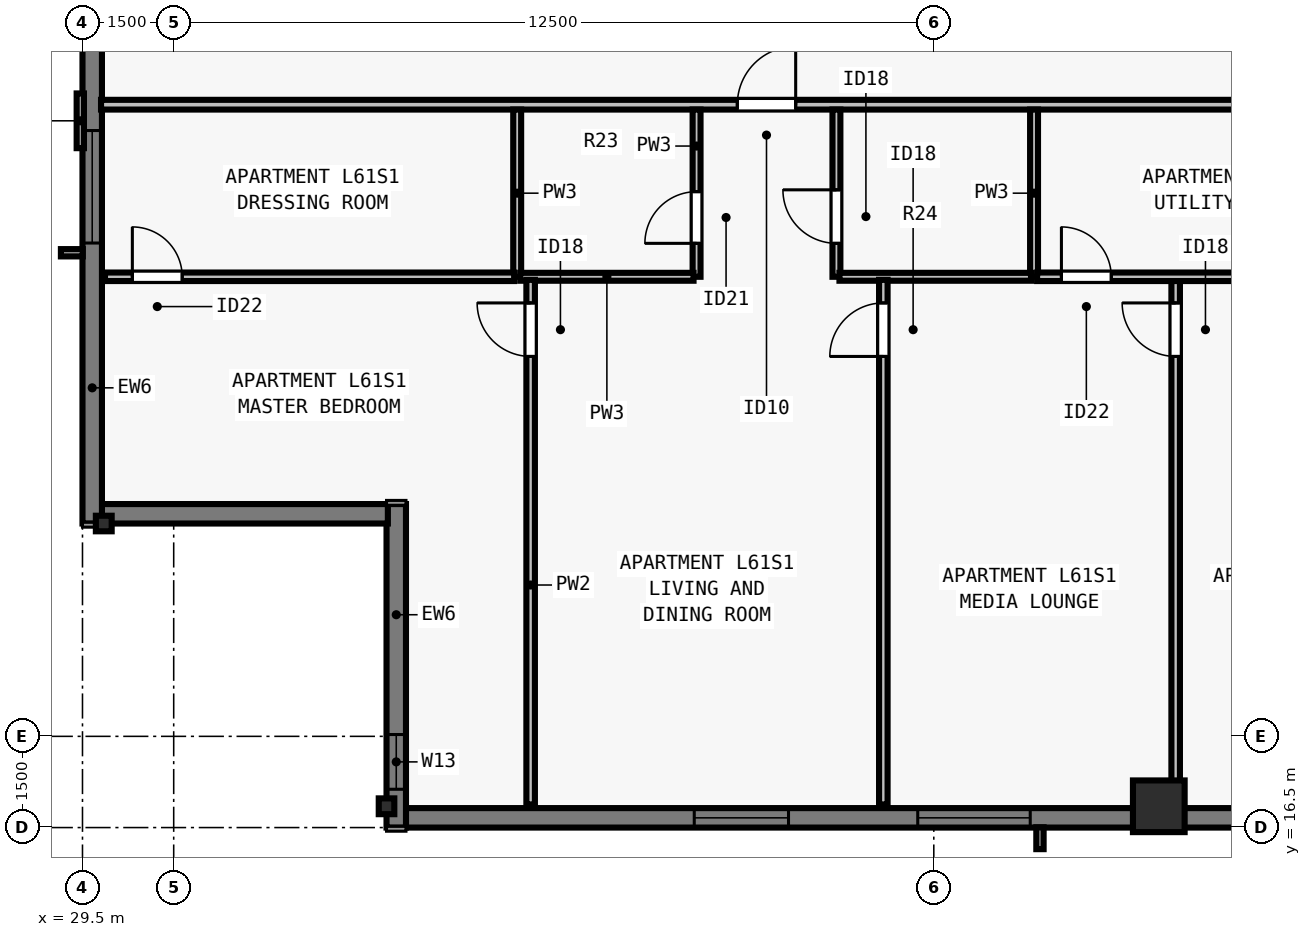
"""IFC4 building model, lengths in metres.
Left out: names, types, materials, properties, quantities, classifications, styles, units other than length and angle.
Written with IfcOpenShell. Run it as: python <this file> out.ifc"""

import sys

from ifc_helpers import new_model, si_unit, direction, frame, frame_2d, origin, origin_2d, place, context, subcontext, project, spatial, rectangle, i_section, extrude, element, fill, save


model = new_model("IFC4")
c1 = context("Model", 3, precision=1e-05, world=origin(), true_north=direction((0.0, 1.0)))
c2 = subcontext(c1, "Body", "Model", "MODEL_VIEW")
j1 = project(units=[si_unit("LENGTHUNIT", "METRE"), si_unit("PLANEANGLEUNIT", "RADIAN")], contexts=[c1])
p1 = place(None, origin())
s1 = spatial("IfcSite", under=j1, at=p1, CompositionType="ELEMENT")
p2 = place(p1, origin())
s2 = spatial("IfcBuilding", under=s1, at=p2, CompositionType="ELEMENT")
p3 = place(p2, frame((0.0, 0.0, 223.5)))
s3 = spatial("IfcBuildingStorey", under=s2, at=p3, CompositionType="ELEMENT", Elevation=223.5)
p4 = place(p3, frame((34.5, 16.85, 0.0), z_axis=(0.0, 0.0, 1.0), x_axis=(1.0, 0.0, 0.0)))
e1 = element("IfcColumn", 1, at=p4, inside=s3, PredefinedType="COLUMN", context=c2, shape_type="SweptSolid", body=[
    extrude(i_section(OverallWidth=0.256, OverallDepth=0.26, WebThickness=0.01, FlangeThickness=0.017, FilletRadius=0.013, at=origin_2d()), origin(), (0.0, 0.0, 1.0), 3.5),
])
p5 = place(p3, frame((47.2, 16.85, 0.0), z_axis=(0.0, 0.0, 1.0), x_axis=(1.0, 0.0, 0.0)))
e2 = element("IfcColumn", 2, at=p5, inside=s3, PredefinedType="COLUMN", context=c2, shape_type="SweptSolid", body=[
    extrude(rectangle(XDim=0.85, YDim=0.85, at=origin_2d()), origin(), (0.0, 0.0, 1.0), 3.5),
])
p6 = place(p3, frame((29.85, 21.5, 0.0), z_axis=(0.0, 0.0, 1.0), x_axis=(0.0, 1.0, 0.0)))
e3 = element("IfcColumn", 3, at=p6, inside=s3, PredefinedType="COLUMN", context=c2, shape_type="SweptSolid", body=[
    extrude(i_section(OverallWidth=0.256, OverallDepth=0.26, WebThickness=0.01, FlangeThickness=0.017, FilletRadius=0.013, at=origin_2d()), origin(), (0.0, 0.0, 1.0), 3.5),
])
p7 = place(p3, frame((69.5, 16.66, 0.0), z_axis=(0.0, 0.0, 1.0), x_axis=(-1.0, 0.0, 0.0)))
e4 = element("IfcWall", 4, at=p7, inside=s3, PredefinedType="SOLIDWALL", context=c2, shape_type="SweptSolid", body=[
    extrude(rectangle(XDim=34.702, YDim=0.32, at=frame_2d((17.351, 0.0))), origin(), (0.0, 0.0, 1.0), 3.29),
])
p8 = place(p7, frame((5.863, 0.0, 0.8)))
e5 = element("IfcOpeningElement", 5, at=p8, cuts=e4, PredefinedType="OPENING", context=c2, shape_type="SweptSolid", body=[
    extrude(rectangle(XDim=1.85, YDim=1.678, at=frame_2d((0.925, 0.839))), frame((0.0, 0.17, 0.0), z_axis=(0.0, -1.0, 0.0), x_axis=(1.0, 0.0, 0.0)), (0.0, 0.0, 1.0), 0.34),
])
p9 = place(p7, frame((8.138, 0.0, 0.8)))
e6 = element("IfcOpeningElement", 6, at=p9, cuts=e4, PredefinedType="OPENING", context=c2, shape_type="SweptSolid", body=[
    extrude(rectangle(XDim=1.55, YDim=1.678, at=frame_2d((0.775, 0.839))), frame((0.0, 0.17, 0.0), z_axis=(0.0, -1.0, 0.0), x_axis=(1.0, 0.0, 0.0)), (0.0, 0.0, 1.0), 0.34),
])
p10 = place(p7, frame((10.113, 0.0, 0.8)))
e7 = element("IfcOpeningElement", 7, at=p10, cuts=e4, PredefinedType="OPENING", context=c2, shape_type="SweptSolid", body=[
    extrude(rectangle(XDim=1.85, YDim=1.678, at=frame_2d((0.925, 0.839))), frame((0.0, 0.17, 0.0), z_axis=(0.0, -1.0, 0.0), x_axis=(1.0, 0.0, 0.0)), (0.0, 0.0, 1.0), 0.34),
])
p11 = place(p7, frame((14.888, 0.0, 0.8)))
e8 = element("IfcOpeningElement", 8, at=p11, cuts=e4, PredefinedType="OPENING", context=c2, shape_type="SweptSolid", body=[
    extrude(rectangle(XDim=1.55, YDim=1.678, at=frame_2d((0.775, 0.839))), frame((0.0, 0.17, 0.0), z_axis=(0.0, -1.0, 0.0), x_axis=(1.0, 0.0, 0.0)), (0.0, 0.0, 1.0), 0.34),
])
p12 = place(p7, frame((18.564, 0.0, 0.8)))
e9 = element("IfcOpeningElement", 9, at=p12, cuts=e4, PredefinedType="OPENING", context=c2, shape_type="SweptSolid", body=[
    extrude(rectangle(XDim=1.85, YDim=1.678, at=frame_2d((0.925, 0.839))), frame((0.0, 0.17, 0.0), z_axis=(0.0, -1.0, 0.0), x_axis=(1.0, 0.0, 0.0)), (0.0, 0.0, 1.0), 0.34),
])
p13 = place(p7, frame((24.414, 0.0, 0.8)))
e10 = element("IfcOpeningElement", 10, at=p13, cuts=e4, PredefinedType="OPENING", context=c2, shape_type="SweptSolid", body=[
    extrude(rectangle(XDim=1.85, YDim=1.678, at=frame_2d((0.925, 0.839))), frame((0.0, 0.17, 0.0), z_axis=(0.0, -1.0, 0.0), x_axis=(1.0, 0.0, 0.0)), (0.0, 0.0, 1.0), 0.34),
])
p14 = place(p7, frame((28.389, 0.0, 0.8)))
e11 = element("IfcOpeningElement", 11, at=p14, cuts=e4, PredefinedType="OPENING", context=c2, shape_type="SweptSolid", body=[
    extrude(rectangle(XDim=1.55, YDim=1.678, at=frame_2d((0.775, 0.839))), frame((0.0, 0.17, 0.0), z_axis=(0.0, -1.0, 0.0), x_axis=(1.0, 0.0, 0.0)), (0.0, 0.0, 1.0), 0.34),
])
p15 = place(p3, frame((34.66, 16.5, 0.0), z_axis=(0.0, 0.0, 1.0), x_axis=(0.0, 1.0, 0.0)))
e12 = element("IfcWall", 12, at=p15, inside=s3, PredefinedType="SOLIDWALL", context=c2, shape_type="SweptSolid", body=[
    extrude(rectangle(XDim=5.32, YDim=0.32, at=frame_2d((2.66, 0.0))), origin(), (0.0, 0.0, 1.0), 3.29),
])
p16 = place(p15, frame((0.63, 0.0, 0.8)))
e13 = element("IfcOpeningElement", 13, at=p16, cuts=e12, PredefinedType="OPENING", context=c2, shape_type="SweptSolid", body=[
    extrude(rectangle(XDim=0.9, YDim=1.678, at=frame_2d((0.45, 0.839))), frame((0.0, 0.17, 0.0), z_axis=(0.0, -1.0, 0.0), x_axis=(1.0, 0.0, 0.0)), (0.0, 0.0, 1.0), 0.34),
])
p17 = place(p3, frame((34.522, 21.66, 0.0), z_axis=(0.0, 0.0, 1.0), x_axis=(-1.0, 0.0, 0.0)))
e14 = element("IfcWall", 14, at=p17, inside=s3, PredefinedType="SOLIDWALL", context=c2, shape_type="SweptSolid", body=[
    extrude(rectangle(XDim=4.724, YDim=0.32, at=frame_2d((2.362, 0.0))), origin(), (0.0, 0.0, 1.0), 3.29),
])
p18 = place(p3, frame((29.66, 21.5, 0.0), z_axis=(0.0, 0.0, 1.0), x_axis=(0.0, 1.0, 0.0)))
e15 = element("IfcWall", 15, at=p18, inside=s3, PredefinedType="SOLIDWALL", context=c2, shape_type="SweptSolid", body=[
    extrude(rectangle(XDim=34.702, YDim=0.32, at=frame_2d((17.351, 0.0))), origin(), (0.0, 0.0, 1.0), 3.29),
])
p19 = place(p18, frame((4.613, 0.0, 0.8)))
e16 = element("IfcOpeningElement", 16, at=p19, cuts=e15, PredefinedType="OPENING", context=c2, shape_type="SweptSolid", body=[
    extrude(rectangle(XDim=1.85, YDim=1.678, at=frame_2d((0.925, 0.839))), frame((0.0, 0.17, 0.0), z_axis=(0.0, -1.0, 0.0), x_axis=(1.0, 0.0, 0.0)), (0.0, 0.0, 1.0), 0.34),
])
p20 = place(p18, frame((9.388, 0.0, 0.8)))
e17 = element("IfcOpeningElement", 17, at=p20, cuts=e15, PredefinedType="OPENING", context=c2, shape_type="SweptSolid", body=[
    extrude(rectangle(XDim=1.55, YDim=1.678, at=frame_2d((0.775, 0.839))), frame((0.0, 0.17, 0.0), z_axis=(0.0, -1.0, 0.0), x_axis=(1.0, 0.0, 0.0)), (0.0, 0.0, 1.0), 0.34),
])
p21 = place(p18, frame((14.888, 0.0, 0.8)))
e18 = element("IfcOpeningElement", 18, at=p21, cuts=e15, PredefinedType="OPENING", context=c2, shape_type="SweptSolid", body=[
    extrude(rectangle(XDim=1.55, YDim=1.678, at=frame_2d((0.775, 0.839))), frame((0.0, 0.17, 0.0), z_axis=(0.0, -1.0, 0.0), x_axis=(1.0, 0.0, 0.0)), (0.0, 0.0, 1.0), 0.34),
])
p22 = place(p18, frame((19.364, 0.0, 0.8)))
e19 = element("IfcOpeningElement", 19, at=p22, cuts=e15, PredefinedType="OPENING", context=c2, shape_type="SweptSolid", body=[
    extrude(rectangle(XDim=1.85, YDim=1.678, at=frame_2d((0.925, 0.839))), frame((0.0, 0.17, 0.0), z_axis=(0.0, -1.0, 0.0), x_axis=(1.0, 0.0, 0.0)), (0.0, 0.0, 1.0), 0.34),
])
p23 = place(p18, frame((23.614, 0.0, 0.8)))
e20 = element("IfcOpeningElement", 20, at=p23, cuts=e15, PredefinedType="OPENING", context=c2, shape_type="SweptSolid", body=[
    extrude(rectangle(XDim=1.85, YDim=1.678, at=frame_2d((0.925, 0.839))), frame((0.0, 0.17, 0.0), z_axis=(0.0, -1.0, 0.0), x_axis=(1.0, 0.0, 0.0)), (0.0, 0.0, 1.0), 0.34),
])
p24 = place(p18, frame((28.839, 0.0, 0.8)))
e21 = element("IfcOpeningElement", 21, at=p24, cuts=e15, PredefinedType="OPENING", context=c2, shape_type="SweptSolid", body=[
    extrude(rectangle(XDim=1.55, YDim=1.678, at=frame_2d((0.775, 0.839))), frame((0.0, 0.17, 0.0), z_axis=(0.0, -1.0, 0.0), x_axis=(1.0, 0.0, 0.0)), (0.0, 0.0, 1.0), 0.34),
])
p25 = place(p18, frame((31.35, 0.0, 0.8)))
e22 = element("IfcOpeningElement", 22, at=p25, cuts=e15, PredefinedType="OPENING", context=c2, shape_type="SweptSolid", body=[
    extrude(rectangle(XDim=0.9, YDim=1.678, at=frame_2d((0.45, 0.839))), frame((0.0, 0.17, 0.0), z_axis=(0.0, -1.0, 0.0), x_axis=(1.0, 0.0, 0.0)), (0.0, 0.0, 1.0), 0.34),
])
p26 = place(p3, frame((29.805, 28.387, 0.0), z_axis=(0.0, 0.0, 1.0), x_axis=(1.0, 0.0, 0.0)))
e23 = element("IfcWall", 23, at=p26, inside=s3, PredefinedType="PARTITIONING", context=c2, shape_type="SweptSolid", body=[
    extrude(rectangle(XDim=44.39, YDim=0.16, at=frame_2d((22.195, 0.0))), origin(), (0.0, 0.0, 1.0), 2.958),
])
p27 = place(p26, frame((10.464, 0.0, 0.0)))
e24 = element("IfcOpeningElement", 24, at=p27, cuts=e23, PredefinedType="OPENING", context=c2, shape_type="SweptSolid", body=[
    extrude(rectangle(XDim=0.96, YDim=2.18, at=frame_2d((0.48, 1.09))), frame((0.0, 0.09, 0.0), z_axis=(0.0, -1.0, 0.0), x_axis=(1.0, 0.0, 0.0)), (0.0, 0.0, 1.0), 0.18),
])
p28 = place(p26, frame((32.544, 0.0, 0.0)))
e25 = element("IfcOpeningElement", 25, at=p28, cuts=e23, PredefinedType="OPENING", context=c2, shape_type="SweptSolid", body=[
    extrude(rectangle(XDim=0.96, YDim=2.18, at=frame_2d((0.48, 1.09))), frame((0.0, 0.09, 0.0), z_axis=(0.0, -1.0, 0.0), x_axis=(1.0, 0.0, 0.0)), (0.0, 0.0, 1.0), 0.18),
])
p29 = place(p3, frame((36.649, 25.558, 0.0), z_axis=(0.0, 0.0, 1.0), x_axis=(0.0, 1.0, 0.0)))
e26 = element("IfcWall", 26, at=p29, inside=s3, PredefinedType="PLUMBINGWALL", context=c2, shape_type="SweptSolid", body=[
    extrude(rectangle(XDim=2.75, YDim=0.13, at=frame_2d((1.375, 0.0))), origin(), (0.0, 0.0, 1.0), 3.29),
])
p30 = place(p3, frame((39.599, 25.558, 0.0), z_axis=(0.0, 0.0, 1.0), x_axis=(0.0, 1.0, 0.0)))
e27 = element("IfcWall", 27, at=p30, inside=s3, PredefinedType="PLUMBINGWALL", context=c2, shape_type="SweptSolid", body=[
    extrude(rectangle(XDim=2.75, YDim=0.13, at=frame_2d((1.375, 0.0))), origin(), (0.0, 0.0, 1.0), 3.29),
])
p31 = place(p30, frame((0.55, 0.0, 0.0)))
e28 = element("IfcOpeningElement", 28, at=p31, cuts=e27, PredefinedType="OPENING", context=c2, shape_type="SweptSolid", body=[
    extrude(rectangle(XDim=0.85, YDim=2.08, at=frame_2d((0.425, 1.04))), frame((0.0, 0.075, 0.0), z_axis=(0.0, -1.0, 0.0), x_axis=(1.0, 0.0, 0.0)), (0.0, 0.0, 1.0), 0.15),
])
p32 = place(p3, frame((36.699, 25.558, 0.0), z_axis=(0.0, 0.0, 1.0), x_axis=(1.0, 0.0, 0.0)))
e29 = element("IfcWall", 29, at=p32, inside=s3, PredefinedType="PLUMBINGWALL", context=c2, shape_type="SweptSolid", body=[
    extrude(rectangle(XDim=2.85, YDim=0.13, at=frame_2d((1.425, 0.0))), origin(), (0.0, 0.0, 1.0), 3.29),
])
p33 = place(p3, frame((45.149, 25.558, 0.0), z_axis=(0.0, 0.0, 1.0), x_axis=(0.0, 1.0, 0.0)))
e30 = element("IfcWall", 30, at=p33, inside=s3, PredefinedType="PLUMBINGWALL", context=c2, shape_type="SweptSolid", body=[
    extrude(rectangle(XDim=2.75, YDim=0.13, at=frame_2d((1.375, 0.0))), origin(), (0.0, 0.0, 1.0), 3.29),
])
p34 = place(p3, frame((41.899, 25.558, 0.0), z_axis=(0.0, 0.0, 1.0), x_axis=(0.0, 1.0, 0.0)))
e31 = element("IfcWall", 31, at=p34, inside=s3, PredefinedType="PLUMBINGWALL", context=c2, shape_type="SweptSolid", body=[
    extrude(rectangle(XDim=2.75, YDim=0.13, at=frame_2d((1.375, 0.0))), origin(), (0.0, 0.0, 1.0), 2.573),
])
p35 = place(p34, frame((0.55, 0.0, 0.0)))
e32 = element("IfcOpeningElement", 32, at=p35, cuts=e31, PredefinedType="OPENING", context=c2, shape_type="SweptSolid", body=[
    extrude(rectangle(XDim=0.88, YDim=2.1, at=frame_2d((0.44, 1.05))), frame((0.0, 0.075, 0.0), z_axis=(0.0, -1.0, 0.0), x_axis=(1.0, 0.0, 0.0)), (0.0, 0.0, 1.0), 0.15),
])
p36 = place(p3, frame((41.949, 25.558, 0.0), z_axis=(0.0, 0.0, 1.0), x_axis=(1.0, 0.0, 0.0)))
e33 = element("IfcWall", 33, at=p36, inside=s3, PredefinedType="PLUMBINGWALL", context=c2, shape_type="SweptSolid", body=[
    extrude(rectangle(XDim=3.15, YDim=0.13, at=frame_2d((1.575, 0.0))), origin(), (0.0, 0.0, 1.0), 3.29),
])
p37 = place(p3, frame((36.87, 16.88, 0.0), z_axis=(0.0, 0.0, 1.0), x_axis=(0.0, 1.0, 0.0)))
e34 = element("IfcWall", 34, at=p37, inside=s3, PredefinedType="PARTITIONING", context=c2, shape_type="SweptSolid", body=[
    extrude(rectangle(XDim=8.628, YDim=0.14, at=frame_2d((4.314, 0.0))), origin(), (0.0, 0.0, 1.0), 2.573),
])
p38 = place(p37, frame((7.367, 0.0, 0.0)))
e35 = element("IfcOpeningElement", 35, at=p38, cuts=e34, PredefinedType="OPENING", context=c2, shape_type="SweptSolid", body=[
    extrude(rectangle(XDim=0.88, YDim=2.1, at=frame_2d((0.44, 1.05))), frame((0.0, 0.08, 0.0), z_axis=(0.0, -1.0, 0.0), x_axis=(1.0, 0.0, 0.0)), (0.0, 0.0, 1.0), 0.16),
])
p39 = place(p3, frame((29.87, 25.558, 0.0), z_axis=(0.0, 0.0, 1.0), x_axis=(1.0, 0.0, 0.0)))
e36 = element("IfcWall", 36, at=p39, inside=s3, PredefinedType="PARTITIONING", context=c2, shape_type="SweptSolid", body=[
    extrude(rectangle(XDim=6.729, YDim=0.14, at=frame_2d((3.364, 0.0))), origin(), (0.0, 0.0, 1.0), 2.958),
])
p40 = place(p39, frame((0.45, 0.0, 0.0)))
e37 = element("IfcOpeningElement", 37, at=p40, cuts=e36, PredefinedType="OPENING", context=c2, shape_type="SweptSolid", body=[
    extrude(rectangle(XDim=0.82, YDim=2.1, at=frame_2d((0.41, 1.05))), frame((0.0, 0.08, 0.0), z_axis=(0.0, -1.0, 0.0), x_axis=(1.0, 0.0, 0.0)), (0.0, 0.0, 1.0), 0.16),
])
p41 = place(p3, frame((47.478, 16.88, 0.0), z_axis=(0.0, 0.0, 1.0), x_axis=(0.0, 1.0, 0.0)))
e38 = element("IfcWall", 38, at=p41, inside=s3, PredefinedType="PARTITIONING", context=c2, shape_type="SweptSolid", body=[
    extrude(rectangle(XDim=8.718, YDim=0.14, at=frame_2d((4.359, 0.0))), origin(), (0.0, 0.0, 1.0), 2.958),
])
p42 = place(p41, frame((7.367, 0.0, 0.0)))
e39 = element("IfcOpeningElement", 39, at=p42, cuts=e38, PredefinedType="OPENING", context=c2, shape_type="SweptSolid", body=[
    extrude(rectangle(XDim=0.88, YDim=2.1, at=frame_2d((0.44, 1.05))), frame((0.0, 0.08, 0.0), z_axis=(0.0, -1.0, 0.0), x_axis=(1.0, 0.0, 0.0)), (0.0, 0.0, 1.0), 0.16),
])
p43 = place(p3, frame((45.199, 25.558, 0.0), z_axis=(0.0, 0.0, 1.0), x_axis=(1.0, 0.0, 0.0)))
e40 = element("IfcWall", 40, at=p43, inside=s3, PredefinedType="PARTITIONING", context=c2, shape_type="SweptSolid", body=[
    extrude(rectangle(XDim=6.429, YDim=0.14, at=frame_2d((3.214, 0.0))), origin(), (0.0, 0.0, 1.0), 3.29),
])
p44 = place(p43, frame((0.4, 0.0, 0.0)))
e41 = element("IfcOpeningElement", 41, at=p44, cuts=e40, PredefinedType="OPENING", context=c2, shape_type="SweptSolid", body=[
    extrude(rectangle(XDim=0.82, YDim=2.1, at=frame_2d((0.41, 1.05))), frame((0.0, 0.08, 0.0), z_axis=(0.0, -1.0, 0.0), x_axis=(1.0, 0.0, 0.0)), (0.0, 0.0, 1.0), 0.16),
])
p45 = place(p3, frame((42.67, 16.88, 0.0), z_axis=(0.0, 0.0, 1.0), x_axis=(0.0, 1.0, 0.0)))
e42 = element("IfcWall", 42, at=p45, inside=s3, PredefinedType="PARTITIONING", context=c2, shape_type="SweptSolid", body=[
    extrude(rectangle(XDim=8.628, YDim=0.14, at=frame_2d((4.314, 0.0))), origin(), (0.0, 0.0, 1.0), 3.29),
])
p46 = place(p45, frame((7.367, 0.0, 0.0)))
e43 = element("IfcOpeningElement", 43, at=p46, cuts=e42, PredefinedType="OPENING", context=c2, shape_type="SweptSolid", body=[
    extrude(rectangle(XDim=0.88, YDim=2.1, at=frame_2d((0.44, 1.05))), frame((0.0, 0.08, 0.0), z_axis=(0.0, -1.0, 0.0), x_axis=(1.0, 0.0, 0.0)), (0.0, 0.0, 1.0), 0.16),
])
p47 = place(p13, origin())
e44 = element("IfcWindow", 44, at=p47, inside=s3, PartitioningType="SINGLE_PANEL", PredefinedType="WINDOW", context=c2, shape_type="SweptSolid", body=[
    extrude(rectangle(XDim=1.85, YDim=1.678, at=frame_2d((0.925, 0.839))), frame((0.0, -0.05, 0.0), z_axis=(0.0, -1.0, 0.0), x_axis=(1.0, 0.0, 0.0)), (0.0, 0.0, 1.0), 0.06),
])
fill(e10, e44)
p48 = place(p14, origin())
e45 = element("IfcWindow", 45, at=p48, inside=s3, PartitioningType="SINGLE_PANEL", PredefinedType="WINDOW", context=c2, shape_type="SweptSolid", body=[
    extrude(rectangle(XDim=1.55, YDim=1.678, at=frame_2d((0.775, 0.839))), frame((0.0, -0.05, 0.0), z_axis=(0.0, -1.0, 0.0), x_axis=(1.0, 0.0, 0.0)), (0.0, 0.0, 1.0), 0.06),
])
fill(e11, e45)
p49 = place(p19, origin())
e46 = element("IfcWindow", 46, at=p49, inside=s3, PartitioningType="SINGLE_PANEL", PredefinedType="WINDOW", context=c2, shape_type="SweptSolid", body=[
    extrude(rectangle(XDim=1.85, YDim=1.678, at=frame_2d((0.925, 0.839))), frame((0.0, -0.05, 0.0), z_axis=(0.0, -1.0, 0.0), x_axis=(1.0, 0.0, 0.0)), (0.0, 0.0, 1.0), 0.06),
])
fill(e16, e46)
p50 = place(p16, origin())
e47 = element("IfcWindow", 47, at=p50, inside=s3, PartitioningType="SINGLE_PANEL", PredefinedType="WINDOW", context=c2, shape_type="SweptSolid", body=[
    extrude(rectangle(XDim=0.9, YDim=1.678, at=frame_2d((0.45, 0.839))), frame((0.0, -0.04, 0.0), z_axis=(0.0, -1.0, 0.0), x_axis=(1.0, 0.0, 0.0)), (0.0, 0.0, 1.0), 0.06),
])
fill(e13, e47)
p51 = place(p31, origin())
e48 = element("IfcDoor", 48, at=p51, inside=s3, OperationType="SINGLE_SWING_LEFT", PredefinedType="DOOR", context=c2, shape_type="SweptSolid", body=[
    extrude(rectangle(XDim=0.85, YDim=2.08, at=frame_2d((0.425, 1.04))), frame((0.0, 0.025, 0.0), z_axis=(0.0, -1.0, 0.0), x_axis=(1.0, 0.0, 0.0)), (0.0, 0.0, 1.0), 0.05),
])
fill(e28, e48)
p52 = place(p35, origin())
e49 = element("IfcDoor", 49, at=p52, inside=s3, OperationType="SINGLE_SWING_RIGHT", PredefinedType="DOOR", context=c2, shape_type="SweptSolid", body=[
    extrude(rectangle(XDim=0.88, YDim=2.1, at=frame_2d((0.44, 1.05))), frame((0.0, 0.025, 0.0), z_axis=(0.0, -1.0, 0.0), x_axis=(1.0, 0.0, 0.0)), (0.0, 0.0, 1.0), 0.05),
])
fill(e32, e49)
p53 = place(p40, origin())
e50 = element("IfcDoor", 50, at=p53, inside=s3, OperationType="SINGLE_SWING_LEFT", PredefinedType="DOOR", context=c2, shape_type="SweptSolid", body=[
    extrude(rectangle(XDim=0.82, YDim=2.1, at=frame_2d((0.41, 1.05))), frame((0.0, 0.025, 0.0), z_axis=(0.0, -1.0, 0.0), x_axis=(1.0, 0.0, 0.0)), (0.0, 0.0, 1.0), 0.05),
])
fill(e37, e50)
p54 = place(p38, origin())
e51 = element("IfcDoor", 51, at=p54, inside=s3, OperationType="SINGLE_SWING_RIGHT", PredefinedType="DOOR", context=c2, shape_type="SweptSolid", body=[
    extrude(rectangle(XDim=0.88, YDim=2.1, at=frame_2d((0.44, 1.05))), frame((0.0, 0.025, 0.0), z_axis=(0.0, -1.0, 0.0), x_axis=(1.0, 0.0, 0.0)), (0.0, 0.0, 1.0), 0.05),
])
fill(e35, e51)
p55 = place(p44, origin())
e52 = element("IfcDoor", 52, at=p55, inside=s3, OperationType="SINGLE_SWING_LEFT", PredefinedType="DOOR", context=c2, shape_type="SweptSolid", body=[
    extrude(rectangle(XDim=0.82, YDim=2.1, at=frame_2d((0.41, 1.05))), frame((0.0, 0.025, 0.0), z_axis=(0.0, -1.0, 0.0), x_axis=(1.0, 0.0, 0.0)), (0.0, 0.0, 1.0), 0.05),
])
fill(e41, e52)
p56 = place(p42, origin())
e53 = element("IfcDoor", 53, at=p56, inside=s3, OperationType="SINGLE_SWING_RIGHT", PredefinedType="DOOR", context=c2, shape_type="SweptSolid", body=[
    extrude(rectangle(XDim=0.88, YDim=2.1, at=frame_2d((0.44, 1.05))), frame((0.0, 0.025, 0.0), z_axis=(0.0, -1.0, 0.0), x_axis=(1.0, 0.0, 0.0)), (0.0, 0.0, 1.0), 0.05),
])
fill(e39, e53)
p57 = place(p46, origin())
e54 = element("IfcDoor", 54, at=p57, inside=s3, OperationType="SINGLE_SWING_LEFT", PredefinedType="DOOR", context=c2, shape_type="SweptSolid", body=[
    extrude(rectangle(XDim=0.88, YDim=2.1, at=frame_2d((0.44, 1.05))), frame((0.0, 0.025, 0.0), z_axis=(0.0, -1.0, 0.0), x_axis=(1.0, 0.0, 0.0)), (0.0, 0.0, 1.0), 0.05),
])
fill(e43, e54)
p58 = place(p27, origin())
e55 = element("IfcDoor", 55, at=p58, inside=s3, OperationType="SINGLE_SWING_RIGHT", PredefinedType="DOOR", context=c2, shape_type="SweptSolid", body=[
    extrude(rectangle(XDim=0.96, YDim=2.18, at=frame_2d((0.48, 1.09))), frame((0.0, 0.025, 0.0), z_axis=(0.0, -1.0, 0.0), x_axis=(1.0, 0.0, 0.0)), (0.0, 0.0, 1.0), 0.05),
])
fill(e24, e55)
save(model, sys.argv[1])
